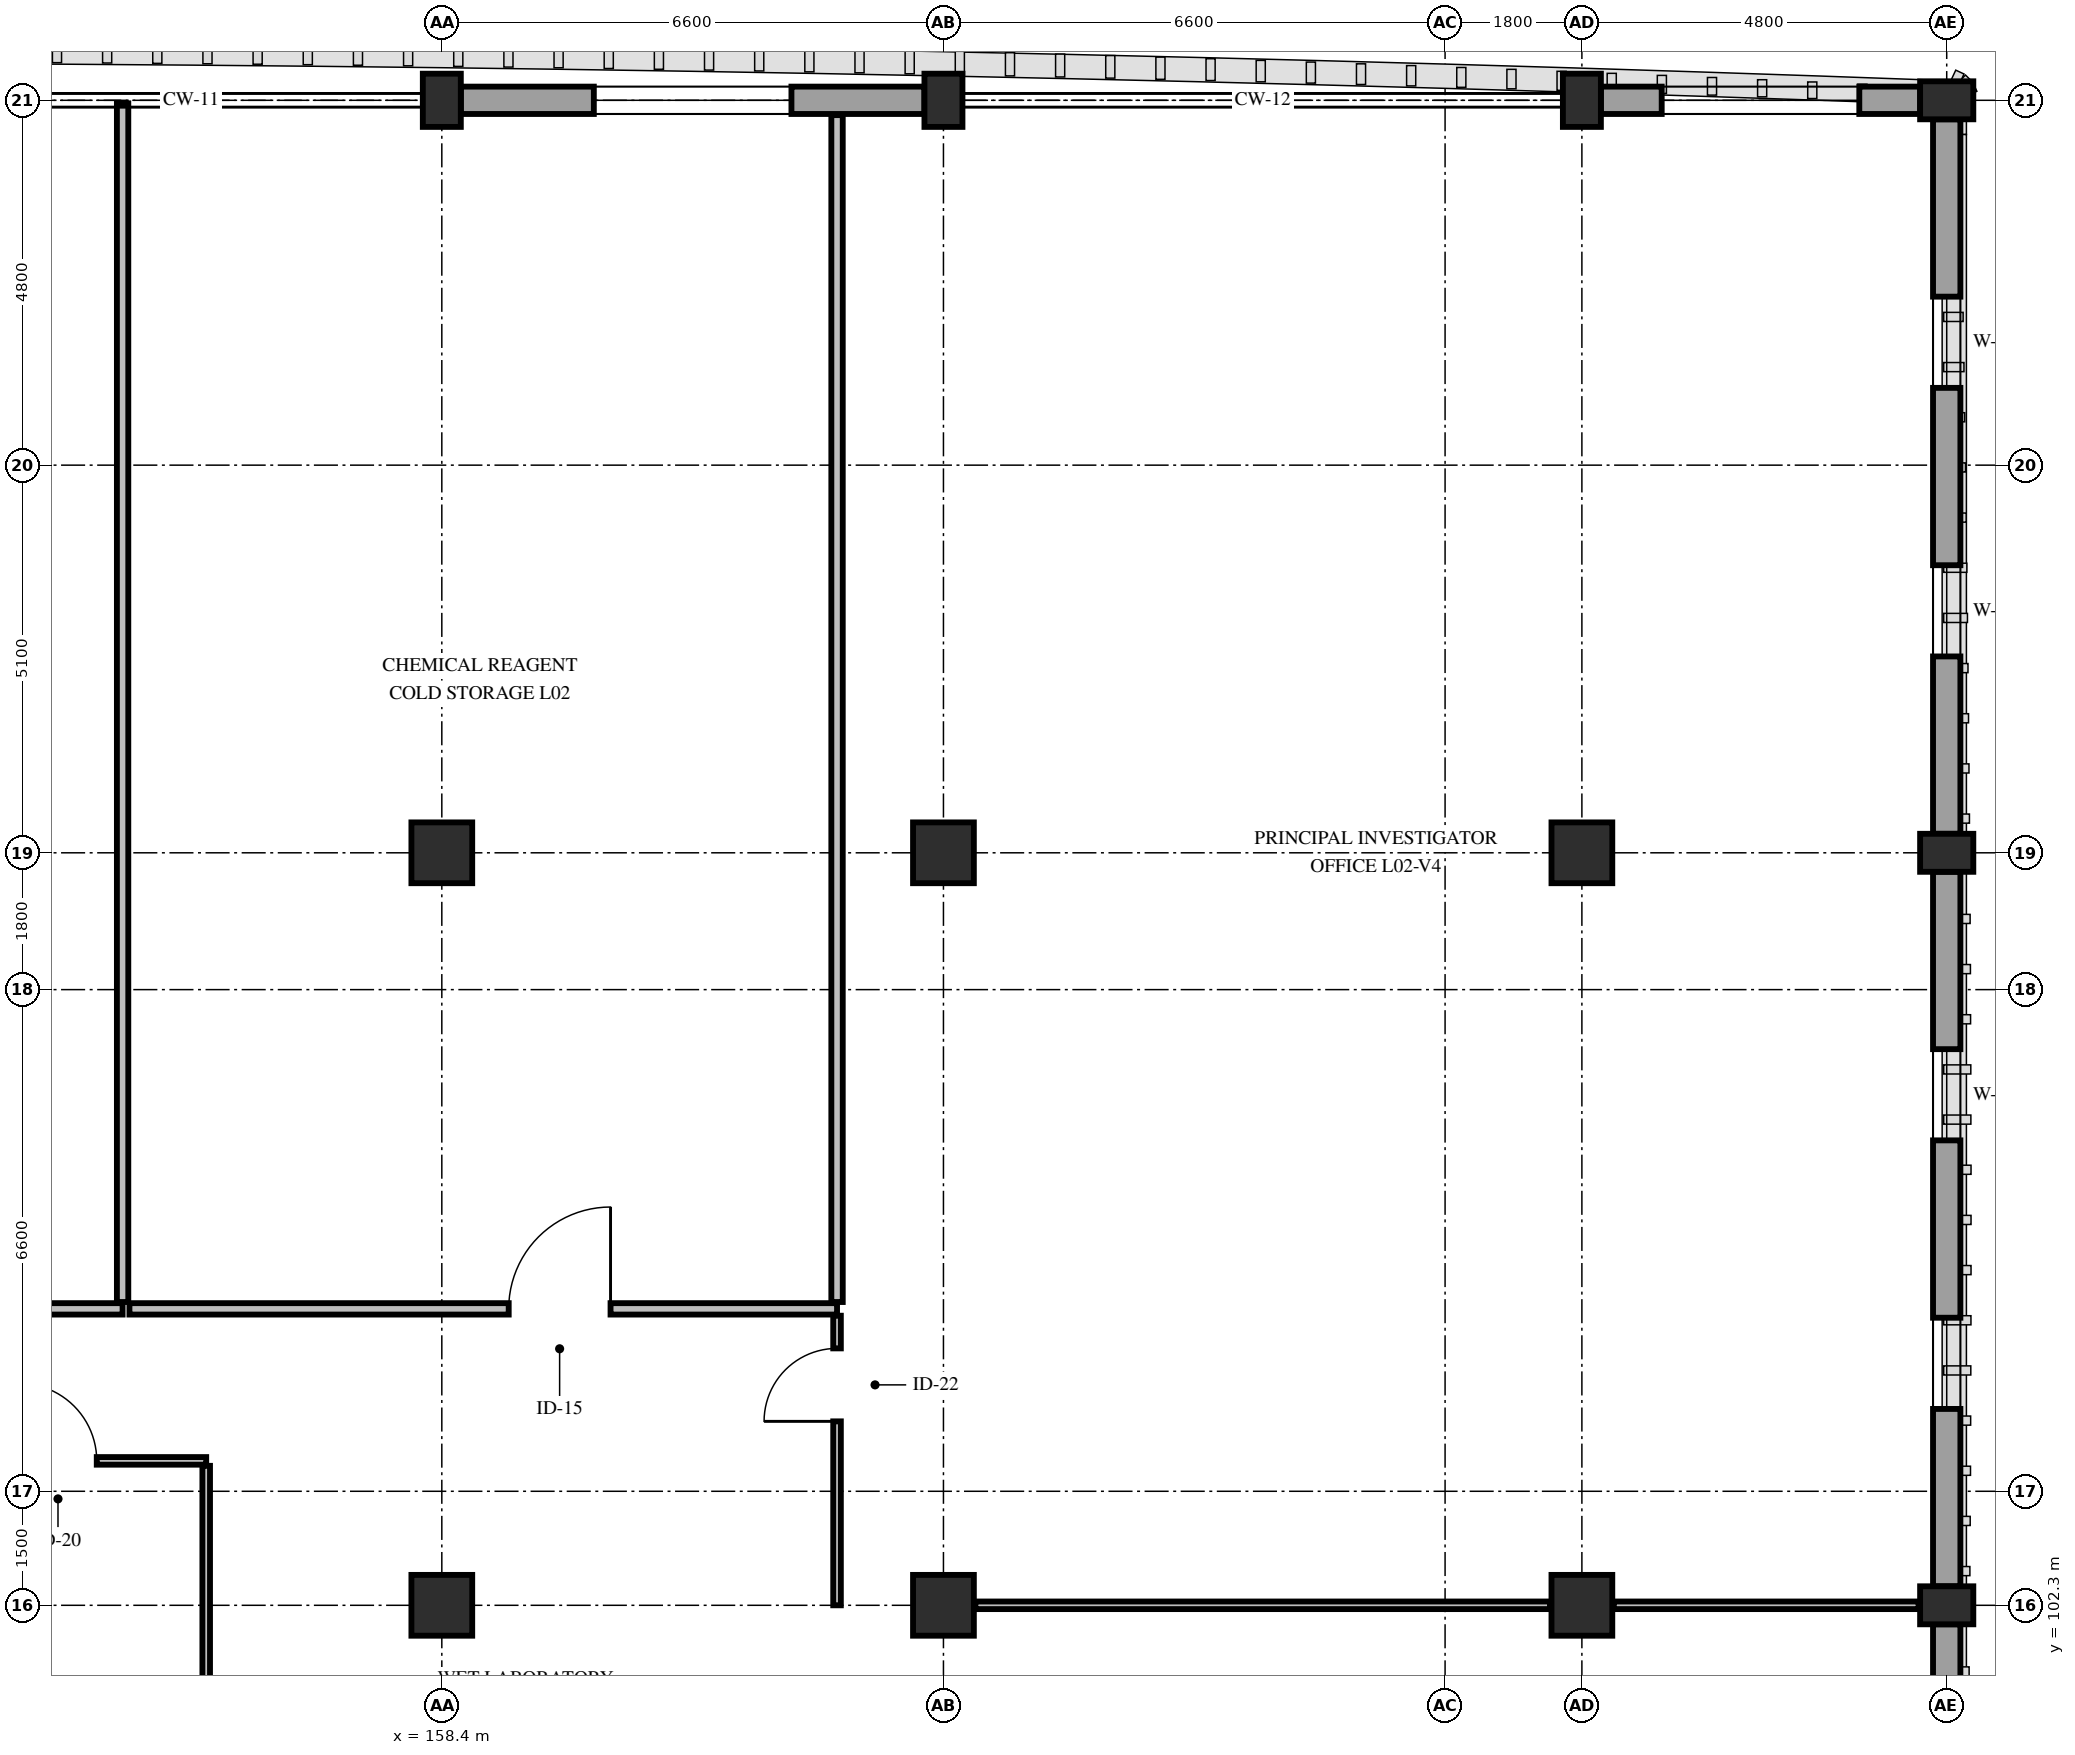
"""IFC4 building model, lengths in metres.
Left out: names, types, materials, properties, quantities, classifications, styles, units other than length and angle.
Written with IfcOpenShell. Run it as: python <this file> out.ifc"""

import sys

from ifc_helpers import new_model, si_unit, direction, frame, frame_2d, origin, origin_2d, place, context, subcontext, project, spatial, rectangle, extrude, element, fill, save


model = new_model("IFC4")
c1 = context("Model", 3, precision=1e-05, world=origin(), true_north=direction((0.0, 1.0)))
c2 = subcontext(c1, "Body", "Model", "MODEL_VIEW")
j1 = project(units=[si_unit("LENGTHUNIT", "METRE"), si_unit("PLANEANGLEUNIT", "RADIAN")], contexts=[c1])
p1 = place(None, origin())
s1 = spatial("IfcSite", under=j1, at=p1, CompositionType="ELEMENT")
p2 = place(p1, origin())
s2 = spatial("IfcBuilding", under=s1, at=p2, CompositionType="ELEMENT")
p3 = place(p2, frame((0.0, 0.0, 10.2)))
s3 = spatial("IfcBuildingStorey", under=s2, at=p3, CompositionType="ELEMENT", Elevation=10.2)
for number, where, z_axis, x_axis in (
    (1, (158.4, 102.3, 0.0), (0.0, 0.0, 1.0), (1.0, 0.0, 0.0)),
    (2, (158.4, 112.2, 0.0), (0.0, 0.0, 1.0), (1.0, 0.0, 0.0)),
):
    element("IfcColumn", number, at=place(p3, frame(where, z_axis=z_axis, x_axis=x_axis)), inside=s3, PredefinedType="COLUMN", context=c2, shape_type="SweptSolid", body=[
        extrude(rectangle(XDim=0.8, YDim=0.8, at=origin_2d()), origin(), (0.0, 0.0, 1.0), 4.8),
    ])
p4 = place(p3, frame((158.4, 122.1, 0.0), z_axis=(0.0, 0.0, 1.0), x_axis=(1.0, 0.0, 0.0)))
e3 = element("IfcColumn", 3, at=p4, inside=s3, PredefinedType="PILASTER", context=c2, shape_type="SweptSolid", body=[
    extrude(rectangle(XDim=0.5, YDim=0.7, at=origin_2d()), origin(), (0.0, 0.0, 1.0), 4.8),
])
for number, where, z_axis, x_axis in (
    (4, (165.0, 102.3, 0.0), (0.0, 0.0, 1.0), (1.0, 0.0, 0.0)),
    (5, (165.0, 112.2, 0.0), (0.0, 0.0, 1.0), (1.0, 0.0, 0.0)),
):
    element("IfcColumn", number, at=place(p3, frame(where, z_axis=z_axis, x_axis=x_axis)), inside=s3, PredefinedType="COLUMN", context=c2, shape_type="SweptSolid", body=[
        extrude(rectangle(XDim=0.8, YDim=0.8, at=origin_2d()), origin(), (0.0, 0.0, 1.0), 4.8),
    ])
p5 = place(p3, frame((165.0, 122.1, 0.0), z_axis=(0.0, 0.0, 1.0), x_axis=(1.0, 0.0, 0.0)))
e6 = element("IfcColumn", 6, at=p5, inside=s3, PredefinedType="PILASTER", context=c2, shape_type="SweptSolid", body=[
    extrude(rectangle(XDim=0.5, YDim=0.7, at=origin_2d()), origin(), (0.0, 0.0, 1.0), 4.8),
])
for number, where, z_axis, x_axis in (
    (7, (173.4, 102.3, 0.0), (0.0, 0.0, 1.0), (1.0, 0.0, 0.0)),
    (8, (173.4, 112.2, 0.0), (0.0, 0.0, 1.0), (1.0, 0.0, 0.0)),
):
    element("IfcColumn", number, at=place(p3, frame(where, z_axis=z_axis, x_axis=x_axis)), inside=s3, PredefinedType="COLUMN", context=c2, shape_type="SweptSolid", body=[
        extrude(rectangle(XDim=0.8, YDim=0.8, at=origin_2d()), origin(), (0.0, 0.0, 1.0), 4.8),
    ])
for number, where, z_axis, x_axis in (
    (9, (173.4, 122.1, 0.0), (0.0, 0.0, 1.0), (1.0, 0.0, 0.0)),
    (10, (178.2, 102.3, 0.0), (0.0, 0.0, 1.0), (0.0, 1.0, 0.0)),
    (11, (178.2, 112.2, 0.0), (0.0, 0.0, 1.0), (0.0, 1.0, 0.0)),
    (12, (178.2, 122.1, 0.0), (0.0, 0.0, 1.0), (0.0, 1.0, 0.0)),
):
    element("IfcColumn", number, at=place(p3, frame(where, z_axis=z_axis, x_axis=x_axis)), inside=s3, PredefinedType="PILASTER", context=c2, shape_type="SweptSolid", body=[
        extrude(rectangle(XDim=0.5, YDim=0.7, at=origin_2d()), origin(), (0.0, 0.0, 1.0), 4.8),
    ])
p6 = place(p3, frame((158.65, 122.1, 0.0), z_axis=(0.0, 0.0, 1.0), x_axis=(1.0, 0.0, 0.0)))
e13 = element("IfcWall", 13, at=p6, inside=s3, PredefinedType="STANDARD", context=c2, shape_type="SweptSolid", body=[
    extrude(rectangle(XDim=6.1, YDim=0.36, at=frame_2d((3.05, 0.0))), origin(), (0.0, 0.0, 1.0), 3.78),
])
p7 = place(p6, frame((1.75, 0.0, 0.85)))
e14 = element("IfcOpeningElement", 14, at=p7, cuts=e13, PredefinedType="OPENING", context=c2, shape_type="SweptSolid", body=[
    extrude(rectangle(XDim=2.6, YDim=1.88, at=frame_2d((1.3, 0.94))), frame((0.0, 0.195, 0.0), z_axis=(0.0, -1.0, 0.0), x_axis=(1.0, 0.0, 0.0)), (0.0, 0.0, 1.0), 0.39),
])
p8 = place(p3, frame((173.65, 122.1, 0.0), z_axis=(0.0, 0.0, 1.0), x_axis=(1.0, 0.0, 0.0)))
e15 = element("IfcWall", 15, at=p8, inside=s3, PredefinedType="STANDARD", context=c2, shape_type="SweptSolid", body=[
    extrude(rectangle(XDim=4.2, YDim=0.36, at=frame_2d((2.1, 0.0))), origin(), (0.0, 0.0, 1.0), 3.78),
])
p9 = place(p8, frame((0.8, 0.0, 0.85)))
e16 = element("IfcOpeningElement", 16, at=p9, cuts=e15, PredefinedType="OPENING", context=c2, shape_type="SweptSolid", body=[
    extrude(rectangle(XDim=2.6, YDim=1.88, at=frame_2d((1.3, 0.94))), frame((0.0, 0.195, 0.0), z_axis=(0.0, -1.0, 0.0), x_axis=(1.0, 0.0, 0.0)), (0.0, 0.0, 1.0), 0.39),
])
p10 = place(p3, frame((178.2, 121.85, 0.0), z_axis=(0.0, 0.0, 1.0), x_axis=(0.0, -1.0, 0.0)))
e17 = element("IfcWall", 17, at=p10, inside=s3, PredefinedType="STANDARD", context=c2, shape_type="SweptSolid", body=[
    extrude(rectangle(XDim=9.4, YDim=0.36, at=frame_2d((4.7, 0.0))), origin(), (0.0, 0.0, 1.0), 3.95),
])
p11 = place(p10, frame((2.333, 0.0, 0.85)))
e18 = element("IfcOpeningElement", 18, at=p11, cuts=e17, PredefinedType="OPENING", context=c2, shape_type="SweptSolid", body=[
    extrude(rectangle(XDim=1.2, YDim=2.08, at=frame_2d((0.6, 1.04))), frame((0.0, 0.195, 0.0), z_axis=(0.0, -1.0, 0.0), x_axis=(1.0, 0.0, 0.0)), (0.0, 0.0, 1.0), 0.39),
])
p12 = place(p10, frame((5.867, 0.0, 0.85)))
e19 = element("IfcOpeningElement", 19, at=p12, cuts=e17, PredefinedType="OPENING", context=c2, shape_type="SweptSolid", body=[
    extrude(rectangle(XDim=1.2, YDim=2.08, at=frame_2d((0.6, 1.04))), frame((0.0, 0.195, 0.0), z_axis=(0.0, -1.0, 0.0), x_axis=(1.0, 0.0, 0.0)), (0.0, 0.0, 1.0), 0.39),
])
p13 = place(p3, frame((178.2, 111.95, 0.0), z_axis=(0.0, 0.0, 1.0), x_axis=(0.0, -1.0, 0.0)))
e20 = element("IfcWall", 20, at=p13, inside=s3, PredefinedType="STANDARD", context=c2, shape_type="SweptSolid", body=[
    extrude(rectangle(XDim=9.4, YDim=0.36, at=frame_2d((4.7, 0.0))), origin(), (0.0, 0.0, 1.0), 3.95),
])
p14 = place(p13, frame((2.333, 0.0, 0.85)))
e21 = element("IfcOpeningElement", 21, at=p14, cuts=e20, PredefinedType="OPENING", context=c2, shape_type="SweptSolid", body=[
    extrude(rectangle(XDim=1.2, YDim=2.08, at=frame_2d((0.6, 1.04))), frame((0.0, 0.195, 0.0), z_axis=(0.0, -1.0, 0.0), x_axis=(1.0, 0.0, 0.0)), (0.0, 0.0, 1.0), 0.39),
])
p15 = place(p13, frame((5.867, 0.0, 0.85)))
e22 = element("IfcOpeningElement", 22, at=p15, cuts=e20, PredefinedType="OPENING", context=c2, shape_type="SweptSolid", body=[
    extrude(rectangle(XDim=1.2, YDim=2.08, at=frame_2d((0.6, 1.04))), frame((0.0, 0.195, 0.0), z_axis=(0.0, -1.0, 0.0), x_axis=(1.0, 0.0, 0.0)), (0.0, 0.0, 1.0), 0.39),
])
p16 = place(p3, frame((178.2, 102.05, 0.0), z_axis=(0.0, 0.0, 1.0), x_axis=(0.0, -1.0, 0.0)))
e23 = element("IfcWall", 23, at=p16, inside=s3, PredefinedType="STANDARD", context=c2, shape_type="SweptSolid", body=[
    extrude(rectangle(XDim=9.4, YDim=0.36, at=frame_2d((4.7, 0.0))), origin(), (0.0, 0.0, 1.0), 3.95),
])
p17 = place(p16, frame((2.333, 0.0, 0.85)))
e24 = element("IfcOpeningElement", 24, at=p17, cuts=e23, PredefinedType="OPENING", context=c2, shape_type="SweptSolid", body=[
    extrude(rectangle(XDim=1.2, YDim=2.08, at=frame_2d((0.6, 1.04))), frame((0.0, 0.195, 0.0), z_axis=(0.0, -1.0, 0.0), x_axis=(1.0, 0.0, 0.0)), (0.0, 0.0, 1.0), 0.39),
])
p18 = place(p16, frame((5.867, 0.0, 0.85)))
e25 = element("IfcOpeningElement", 25, at=p18, cuts=e23, PredefinedType="OPENING", context=c2, shape_type="SweptSolid", body=[
    extrude(rectangle(XDim=1.2, YDim=2.08, at=frame_2d((0.6, 1.04))), frame((0.0, 0.195, 0.0), z_axis=(0.0, -1.0, 0.0), x_axis=(1.0, 0.0, 0.0)), (0.0, 0.0, 1.0), 0.39),
])
p19 = place(p3, frame((136.91, 106.2, 0.0), z_axis=(0.0, 0.0, 1.0), x_axis=(1.0, 0.0, 0.0)))
e26 = element("IfcWall", 26, at=p19, inside=s3, PredefinedType="PARTITIONING", context=c2, shape_type="SweptSolid", body=[
    extrude(rectangle(XDim=17.29, YDim=0.15, at=frame_2d((8.645, 0.0))), origin(), (0.0, 0.0, 1.0), 3.78),
])
p20 = place(p19, frame((9.03, 0.0, 0.0)))
e27 = element("IfcOpeningElement", 27, at=p20, cuts=e26, PredefinedType="OPENING", context=c2, shape_type="SweptSolid", body=[
    extrude(rectangle(XDim=1.62, YDim=2.3, at=frame_2d((0.81, 1.15))), frame((0.0, 0.09, 0.0), z_axis=(0.0, -1.0, 0.0), x_axis=(1.0, 0.0, 0.0)), (0.0, 0.0, 1.0), 0.18),
])
p21 = place(p3, frame((154.2, 106.29, 0.0), z_axis=(0.0, 0.0, 1.0), x_axis=(0.0, 1.0, 0.0)))
e28 = element("IfcWall", 28, at=p21, inside=s3, PredefinedType="PARTITIONING", context=c2, shape_type="SweptSolid", body=[
    extrude(rectangle(XDim=15.77, YDim=0.15, at=frame_2d((7.885, 0.0))), origin(), (0.0, 0.0, 1.0), 3.93),
])
p22 = place(p3, frame((154.29, 106.2, 0.0), z_axis=(0.0, 0.0, 1.0), x_axis=(1.0, 0.0, 0.0)))
e29 = element("IfcWall", 29, at=p22, inside=s3, PredefinedType="PARTITIONING", context=c2, shape_type="SweptSolid", body=[
    extrude(rectangle(XDim=9.31, YDim=0.15, at=frame_2d((4.655, 0.0))), origin(), (0.0, 0.0, 1.0), 3.78),
])
p23 = place(p22, frame((4.99, 0.0, 0.0)))
e30 = element("IfcOpeningElement", 30, at=p23, cuts=e29, PredefinedType="OPENING", context=c2, shape_type="SweptSolid", body=[
    extrude(rectangle(XDim=1.34, YDim=2.2, at=frame_2d((0.67, 1.1))), frame((0.0, 0.09, 0.0), z_axis=(0.0, -1.0, 0.0), x_axis=(1.0, 0.0, 0.0)), (0.0, 0.0, 1.0), 0.18),
])
p24 = place(p3, frame((163.6, 106.29, 0.0), z_axis=(0.0, 0.0, 1.0), x_axis=(0.0, 1.0, 0.0)))
e31 = element("IfcWall", 31, at=p24, inside=s3, PredefinedType="PARTITIONING", context=c2, shape_type="SweptSolid", body=[
    extrude(rectangle(XDim=15.615, YDim=0.15, at=frame_2d((7.808, 0.0))), origin(), (0.0, 0.0, 1.0), 3.93),
])
p25 = place(p3, frame((165.42, 102.3, 0.0), z_axis=(0.0, 0.0, 1.0), x_axis=(1.0, 0.0, 0.0)))
e32 = element("IfcWall", 32, at=p25, inside=s3, PredefinedType="PARTITIONING", context=c2, shape_type="SweptSolid", body=[
    extrude(rectangle(XDim=7.56, YDim=0.1, at=frame_2d((3.78, 0.0))), origin(), (0.0, 0.0, 1.0), 3.83),
])
p26 = place(p3, frame((173.82, 102.3, 0.0), z_axis=(0.0, 0.0, 1.0), x_axis=(1.0, 0.0, 0.0)))
e33 = element("IfcWall", 33, at=p26, inside=s3, PredefinedType="PARTITIONING", context=c2, shape_type="SweptSolid", body=[
    extrude(rectangle(XDim=4.01, YDim=0.1, at=frame_2d((2.005, 0.0))), origin(), (0.0, 0.0, 1.0), 4.065),
])
p27 = place(p3, frame((163.6, 102.3, 0.0), z_axis=(0.0, 0.0, 1.0), x_axis=(0.0, 1.0, 0.0)))
e34 = element("IfcWall", 34, at=p27, inside=s3, PredefinedType="PARTITIONING", context=c2, shape_type="SweptSolid", body=[
    extrude(rectangle(XDim=3.81, YDim=0.1, at=frame_2d((1.905, 0.0))), origin(), (0.0, 0.0, 1.0), 4.065),
])
p28 = place(p27, frame((2.42, 0.0, 0.0)))
e35 = element("IfcOpeningElement", 35, at=p28, cuts=e34, PredefinedType="OPENING", context=c2, shape_type="SweptSolid", body=[
    extrude(rectangle(XDim=0.96, YDim=2.15, at=frame_2d((0.48, 1.075))), frame((0.0, 0.065, 0.0), z_axis=(0.0, -1.0, 0.0), x_axis=(1.0, 0.0, 0.0)), (0.0, 0.0, 1.0), 0.13),
])
p29 = place(p3, frame((148.415, 104.2, 0.0), z_axis=(0.0, 0.0, 1.0), x_axis=(1.0, 0.0, 0.0)))
e36 = element("IfcWall", 36, at=p29, inside=s3, PredefinedType="PARTITIONING", context=c2, shape_type="SweptSolid", body=[
    extrude(rectangle(XDim=6.885, YDim=0.1, at=frame_2d((3.442, 0.0))), origin(), (0.0, 0.0, 1.0), 3.78),
])
p30 = place(p29, frame((4.425, 0.0, 0.0)))
e37 = element("IfcOpeningElement", 37, at=p30, cuts=e36, PredefinedType="OPENING", context=c2, shape_type="SweptSolid", body=[
    extrude(rectangle(XDim=1.02, YDim=2.2, at=frame_2d((0.51, 1.1))), frame((0.0, 0.065, 0.0), z_axis=(0.0, -1.0, 0.0), x_axis=(1.0, 0.0, 0.0)), (0.0, 0.0, 1.0), 0.13),
])
p31 = place(p3, frame((155.3, 92.595, 0.0), z_axis=(0.0, 0.0, 1.0), x_axis=(0.0, 1.0, 0.0)))
e38 = element("IfcWall", 38, at=p31, inside=s3, PredefinedType="PARTITIONING", context=c2, shape_type="SweptSolid", body=[
    extrude(rectangle(XDim=11.54, YDim=0.1, at=frame_2d((5.77, 0.0))), origin(), (0.0, 0.0, 1.0), 3.93),
])
p32 = place(p7, origin())
e39 = element("IfcWindow", 39, at=p32, inside=s3, PartitioningType="DOUBLE_PANEL_VERTICAL", PredefinedType="WINDOW", context=c2, shape_type="SweptSolid", body=[
    extrude(rectangle(XDim=2.6, YDim=1.88, at=frame_2d((1.3, 0.94))), frame((0.0, 0.03, 0.0), z_axis=(0.0, -1.0, 0.0), x_axis=(1.0, 0.0, 0.0)), (0.0, 0.0, 1.0), 0.06),
])
fill(e14, e39)
p33 = place(p9, origin())
e40 = element("IfcWindow", 40, at=p33, inside=s3, PartitioningType="DOUBLE_PANEL_VERTICAL", PredefinedType="WINDOW", context=c2, shape_type="SweptSolid", body=[
    extrude(rectangle(XDim=2.6, YDim=1.88, at=frame_2d((1.3, 0.94))), frame((0.0, 0.03, 0.0), z_axis=(0.0, -1.0, 0.0), x_axis=(1.0, 0.0, 0.0)), (0.0, 0.0, 1.0), 0.06),
])
fill(e16, e40)
p34 = place(p11, origin())
e41 = element("IfcWindow", 41, at=p34, inside=s3, PartitioningType="SINGLE_PANEL", PredefinedType="WINDOW", context=c2, shape_type="SweptSolid", body=[
    extrude(rectangle(XDim=1.2, YDim=2.08, at=frame_2d((0.6, 1.04))), frame((0.0, 0.03, 0.0), z_axis=(0.0, -1.0, 0.0), x_axis=(1.0, 0.0, 0.0)), (0.0, 0.0, 1.0), 0.06),
])
fill(e18, e41)
p35 = place(p12, origin())
e42 = element("IfcWindow", 42, at=p35, inside=s3, PartitioningType="SINGLE_PANEL", PredefinedType="WINDOW", context=c2, shape_type="SweptSolid", body=[
    extrude(rectangle(XDim=1.2, YDim=2.08, at=frame_2d((0.6, 1.04))), frame((0.0, 0.03, 0.0), z_axis=(0.0, -1.0, 0.0), x_axis=(1.0, 0.0, 0.0)), (0.0, 0.0, 1.0), 0.06),
])
fill(e19, e42)
p36 = place(p14, origin())
e43 = element("IfcWindow", 43, at=p36, inside=s3, PartitioningType="SINGLE_PANEL", PredefinedType="WINDOW", context=c2, shape_type="SweptSolid", body=[
    extrude(rectangle(XDim=1.2, YDim=2.08, at=frame_2d((0.6, 1.04))), frame((0.0, 0.03, 0.0), z_axis=(0.0, -1.0, 0.0), x_axis=(1.0, 0.0, 0.0)), (0.0, 0.0, 1.0), 0.06),
])
fill(e21, e43)
p37 = place(p15, origin())
e44 = element("IfcWindow", 44, at=p37, inside=s3, PartitioningType="SINGLE_PANEL", PredefinedType="WINDOW", context=c2, shape_type="SweptSolid", body=[
    extrude(rectangle(XDim=1.2, YDim=2.08, at=frame_2d((0.6, 1.04))), frame((0.0, 0.03, 0.0), z_axis=(0.0, -1.0, 0.0), x_axis=(1.0, 0.0, 0.0)), (0.0, 0.0, 1.0), 0.06),
])
fill(e22, e44)
p38 = place(p23, origin())
e45 = element("IfcDoor", 45, at=p38, inside=s3, OperationType="SINGLE_SWING_RIGHT", PredefinedType="DOOR", context=c2, shape_type="SweptSolid", body=[
    extrude(rectangle(XDim=1.34, YDim=2.2, at=frame_2d((0.67, 1.1))), frame((0.0, 0.025, 0.0), z_axis=(0.0, -1.0, 0.0), x_axis=(1.0, 0.0, 0.0)), (0.0, 0.0, 1.0), 0.05),
])
fill(e30, e45)
p39 = place(p28, origin())
e46 = element("IfcDoor", 46, at=p39, inside=s3, OperationType="SINGLE_SWING_LEFT", PredefinedType="DOOR", context=c2, shape_type="SweptSolid", body=[
    extrude(rectangle(XDim=0.96, YDim=2.15, at=frame_2d((0.48, 1.075))), frame((0.0, 0.025, 0.0), z_axis=(0.0, -1.0, 0.0), x_axis=(1.0, 0.0, 0.0)), (0.0, 0.0, 1.0), 0.05),
])
fill(e35, e46)
p40 = place(p30, origin())
e47 = element("IfcDoor", 47, at=p40, inside=s3, OperationType="SINGLE_SWING_LEFT", PredefinedType="DOOR", context=c2, shape_type="SweptSolid", body=[
    extrude(rectangle(XDim=1.02, YDim=2.2, at=frame_2d((0.51, 1.1))), frame((0.0, 0.025, 0.0), z_axis=(0.0, -1.0, 0.0), x_axis=(1.0, 0.0, 0.0)), (0.0, 0.0, 1.0), 0.05),
])
fill(e37, e47)
save(model, sys.argv[1])
